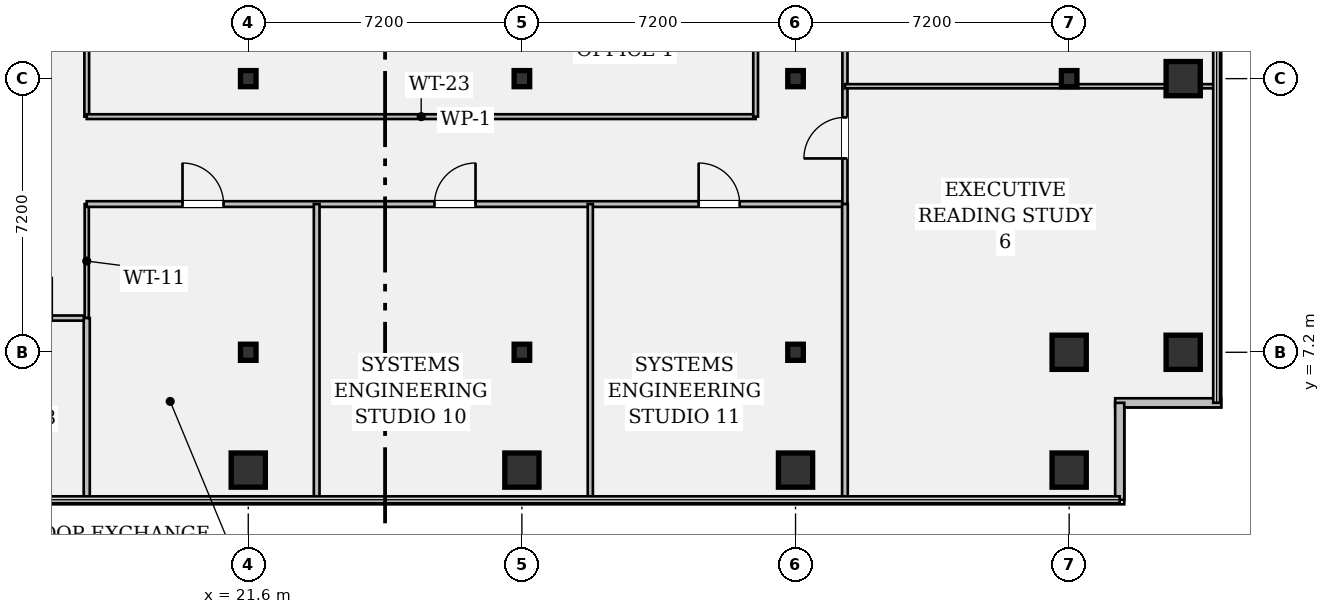
"""IFC4 building model, lengths in metres.
Left out: names, types, materials, properties, quantities, classifications, styles, units other than length and angle.
Written with IfcOpenShell. Run it as: python <this file> out.ifc"""

import sys

from ifc_helpers import new_model, si_unit, direction, frame, frame_2d, origin, origin_2d, place, context, subcontext, project, spatial, rectangle, hollow_rectangle, i_section, extrude, element, fill, save


model = new_model("IFC4")
c1 = context("Model", 3, precision=1e-05, world=origin(), true_north=direction((0.0, 1.0)))
c2 = subcontext(c1, "Body", "Model", "MODEL_VIEW")
j1 = project(units=[si_unit("LENGTHUNIT", "METRE"), si_unit("PLANEANGLEUNIT", "RADIAN")], contexts=[c1])
p1 = place(None, origin())
s1 = spatial("IfcSite", under=j1, at=p1, CompositionType="ELEMENT")
p2 = place(p1, origin())
s2 = spatial("IfcBuilding", under=s1, at=p2, CompositionType="ELEMENT")
p3 = place(p2, frame((0.0, 0.0, 133.0)))
s3 = spatial("IfcBuildingStorey", under=s2, at=p3, CompositionType="ELEMENT", Elevation=133.0)
p4 = place(p3, frame((21.6, 4.1, 0.0), z_axis=(0.0, 0.0, 1.0), x_axis=(1.0, 0.0, 0.0)))
e1 = element("IfcColumn", 1, at=p4, inside=s3, PredefinedType="COLUMN", context=c2, shape_type="SweptSolid", body=[
    extrude(hollow_rectangle(XDim=0.9, YDim=0.9, WallThickness=0.055, at=origin_2d()), origin(), (0.0, 0.0, 1.0), 3.58),
])
for number, where, z_axis, x_axis in (
    (2, (21.6, 7.2, 0.0), (0.0, 0.0, 1.0), (1.0, 0.0, 0.0)),
    (3, (21.6, 14.4, 0.0), (0.0, 0.0, 1.0), (1.0, 0.0, 0.0)),
):
    element("IfcColumn", number, at=place(p3, frame(where, z_axis=z_axis, x_axis=x_axis)), inside=s3, PredefinedType="COLUMN", context=c2, shape_type="SweptSolid", body=[
        extrude(i_section(OverallWidth=0.409, OverallDepth=0.424, WebThickness=0.033, FlangeThickness=0.052, FilletRadius=0.018, at=origin_2d()), origin(), (0.0, 0.0, 1.0), 3.58),
    ])
p5 = place(p3, frame((28.8, 4.1, 0.0), z_axis=(0.0, 0.0, 1.0), x_axis=(1.0, 0.0, 0.0)))
e4 = element("IfcColumn", 4, at=p5, inside=s3, PredefinedType="COLUMN", context=c2, shape_type="SweptSolid", body=[
    extrude(hollow_rectangle(XDim=0.9, YDim=0.9, WallThickness=0.055, at=origin_2d()), origin(), (0.0, 0.0, 1.0), 3.58),
])
for number, where, z_axis, x_axis in (
    (5, (28.8, 7.2, 0.0), (0.0, 0.0, 1.0), (1.0, 0.0, 0.0)),
    (6, (28.8, 14.4, 0.0), (0.0, 0.0, 1.0), (1.0, 0.0, 0.0)),
):
    element("IfcColumn", number, at=place(p3, frame(where, z_axis=z_axis, x_axis=x_axis)), inside=s3, PredefinedType="COLUMN", context=c2, shape_type="SweptSolid", body=[
        extrude(i_section(OverallWidth=0.409, OverallDepth=0.424, WebThickness=0.033, FlangeThickness=0.052, FilletRadius=0.018, at=origin_2d()), origin(), (0.0, 0.0, 1.0), 3.58),
    ])
p6 = place(p3, frame((36.0, 4.1, 0.0), z_axis=(0.0, 0.0, 1.0), x_axis=(1.0, 0.0, 0.0)))
e7 = element("IfcColumn", 7, at=p6, inside=s3, PredefinedType="COLUMN", context=c2, shape_type="SweptSolid", body=[
    extrude(hollow_rectangle(XDim=0.9, YDim=0.9, WallThickness=0.055, at=origin_2d()), origin(), (0.0, 0.0, 1.0), 3.58),
])
for number, where, z_axis, x_axis in (
    (8, (36.0, 7.2, 0.0), (0.0, 0.0, 1.0), (1.0, 0.0, 0.0)),
    (9, (36.0, 14.4, 0.0), (0.0, 0.0, 1.0), (1.0, 0.0, 0.0)),
):
    element("IfcColumn", number, at=place(p3, frame(where, z_axis=z_axis, x_axis=x_axis)), inside=s3, PredefinedType="COLUMN", context=c2, shape_type="SweptSolid", body=[
        extrude(i_section(OverallWidth=0.409, OverallDepth=0.424, WebThickness=0.033, FlangeThickness=0.052, FilletRadius=0.018, at=origin_2d()), origin(), (0.0, 0.0, 1.0), 3.58),
    ])
for number, where, z_axis, x_axis in (
    (10, (43.2, 4.1, 0.0), (0.0, 0.0, 1.0), (1.0, 0.0, 0.0)),
    (11, (43.2, 7.2, 0.0), (0.0, 0.0, 1.0), (1.0, 0.0, 0.0)),
):
    element("IfcColumn", number, at=place(p3, frame(where, z_axis=z_axis, x_axis=x_axis)), inside=s3, PredefinedType="COLUMN", context=c2, shape_type="SweptSolid", body=[
        extrude(hollow_rectangle(XDim=0.9, YDim=0.9, WallThickness=0.055, at=origin_2d()), origin(), (0.0, 0.0, 1.0), 3.58),
    ])
p7 = place(p3, frame((43.2, 14.4, 0.0), z_axis=(0.0, 0.0, 1.0), x_axis=(1.0, 0.0, 0.0)))
e12 = element("IfcColumn", 12, at=p7, inside=s3, PredefinedType="COLUMN", context=c2, shape_type="SweptSolid", body=[
    extrude(i_section(OverallWidth=0.409, OverallDepth=0.424, WebThickness=0.033, FlangeThickness=0.052, FilletRadius=0.018, at=origin_2d()), origin(), (0.0, 0.0, 1.0), 3.58),
])
for number, where, z_axis, x_axis in (
    (13, (46.2, 7.2, 0.0), (0.0, 0.0, 1.0), (1.0, 0.0, 0.0)),
    (14, (46.2, 14.4, 0.0), (0.0, 0.0, 1.0), (1.0, 0.0, 0.0)),
):
    element("IfcColumn", number, at=place(p3, frame(where, z_axis=z_axis, x_axis=x_axis)), inside=s3, PredefinedType="COLUMN", context=c2, shape_type="SweptSolid", body=[
        extrude(hollow_rectangle(XDim=0.9, YDim=0.9, WallThickness=0.055, at=origin_2d()), origin(), (0.0, 0.0, 1.0), 3.58),
    ])
p8 = place(p3, frame((47.2, 5.87, 0.0), z_axis=(0.0, 0.0, 1.0), x_axis=(-1.0, 0.0, 0.0)))
e15 = element("IfcWall", 15, at=p8, inside=s3, PredefinedType="STANDARD", context=c2, shape_type="SweptSolid", body=[
    extrude(rectangle(XDim=2.79, YDim=0.24, at=frame_2d((1.395, 0.0))), origin(), (0.0, 0.0, 1.0), 3.58),
])
p9 = place(p3, frame((44.53, 5.87, 0.0), z_axis=(0.0, 0.0, 1.0), x_axis=(0.0, -1.0, 0.0)))
e16 = element("IfcWall", 16, at=p9, inside=s3, PredefinedType="STANDARD", context=c2, shape_type="SweptSolid", body=[
    extrude(rectangle(XDim=2.55, YDim=0.24, at=frame_2d((1.275, 0.0))), origin(), (0.0, 0.0, 1.0), 3.58),
])
p10 = place(p3, frame((14.4, 8.1, 0.0), z_axis=(0.0, 0.0, 1.0), x_axis=(1.0, 0.0, 0.0)))
e17 = element("IfcWall", 17, at=p10, inside=s3, PredefinedType="PARTITIONING", context=c2, shape_type="SweptSolid", body=[
    extrude(rectangle(XDim=2.95, YDim=0.135, at=frame_2d((1.475, 0.0))), origin(), (0.0, 0.0, 1.0), 3.148),
])
p11 = place(p10, frame((0.95, 0.0, 0.0)))
e18 = element("IfcOpeningElement", 18, at=p11, cuts=e17, PredefinedType="OPENING", context=c2, shape_type="SweptSolid", body=[
    extrude(rectangle(XDim=1.08, YDim=2.15, at=frame_2d((0.54, 1.075))), frame((0.0, 0.08, 0.0), z_axis=(0.0, -1.0, 0.0), x_axis=(1.0, 0.0, 0.0)), (0.0, 0.0, 1.0), 0.159),
])
p12 = place(p3, frame((17.35, 8.1, 0.0), z_axis=(0.0, 0.0, 1.0), x_axis=(0.0, 1.0, 0.0)))
e19 = element("IfcWall", 19, at=p12, inside=s3, PredefinedType="PARTITIONING", context=c2, shape_type="SweptSolid", body=[
    extrude(rectangle(XDim=3.0, YDim=0.11, at=frame_2d((1.5, 0.0))), origin(), (0.0, 0.0, 1.0), 3.58),
])
p13 = place(p3, frame((17.35, 11.1, 0.0), z_axis=(0.0, 0.0, 1.0), x_axis=(1.0, 0.0, 0.0)))
e20 = element("IfcWall", 20, at=p13, inside=s3, PredefinedType="PARTITIONING", context=c2, shape_type="SweptSolid", body=[
    extrude(rectangle(XDim=19.95, YDim=0.15, at=frame_2d((9.975, 0.0))), origin(), (0.0, 0.0, 1.0), 2.869),
])
p14 = place(p13, frame((2.52, 0.0, 0.0)))
e21 = element("IfcOpeningElement", 21, at=p14, cuts=e20, PredefinedType="OPENING", context=c2, shape_type="SweptSolid", body=[
    extrude(rectangle(XDim=1.08, YDim=2.15, at=frame_2d((0.54, 1.075))), frame((0.0, 0.087, 0.0), z_axis=(0.0, -1.0, 0.0), x_axis=(1.0, 0.0, 0.0)), (0.0, 0.0, 1.0), 0.174),
])
p15 = place(p13, frame((9.15, 0.0, 0.0)))
e22 = element("IfcOpeningElement", 22, at=p15, cuts=e20, PredefinedType="OPENING", context=c2, shape_type="SweptSolid", body=[
    extrude(rectangle(XDim=1.08, YDim=2.15, at=frame_2d((0.54, 1.075))), frame((0.0, 0.087, 0.0), z_axis=(0.0, -1.0, 0.0), x_axis=(1.0, 0.0, 0.0)), (0.0, 0.0, 1.0), 0.174),
])
p16 = place(p13, frame((16.1, 0.0, 0.0)))
e23 = element("IfcOpeningElement", 23, at=p16, cuts=e20, PredefinedType="OPENING", context=c2, shape_type="SweptSolid", body=[
    extrude(rectangle(XDim=1.08, YDim=2.15, at=frame_2d((0.54, 1.075))), frame((0.0, 0.087, 0.0), z_axis=(0.0, -1.0, 0.0), x_axis=(1.0, 0.0, 0.0)), (0.0, 0.0, 1.0), 0.174),
])
p17 = place(p3, frame((37.3, 11.1, 0.0), z_axis=(0.0, 0.0, 1.0), x_axis=(0.0, 1.0, 0.0)))
e24 = element("IfcWall", 24, at=p17, inside=s3, PredefinedType="PARTITIONING", context=c2, shape_type="SweptSolid", body=[
    extrude(rectangle(XDim=9.6, YDim=0.135, at=frame_2d((4.8, 0.0))), origin(), (0.0, 0.0, 1.0), 2.869),
])
p18 = place(p17, frame((1.2, 0.0, 0.0)))
e25 = element("IfcOpeningElement", 25, at=p18, cuts=e24, PredefinedType="OPENING", context=c2, shape_type="SweptSolid", body=[
    extrude(rectangle(XDim=1.08, YDim=2.15, at=frame_2d((0.54, 1.075))), frame((0.0, 0.08, 0.0), z_axis=(0.0, -1.0, 0.0), x_axis=(1.0, 0.0, 0.0)), (0.0, 0.0, 1.0), 0.159),
])
p19 = place(p17, frame((7.6, 0.0, 0.0)))
e26 = element("IfcOpeningElement", 26, at=p19, cuts=e24, PredefinedType="OPENING", context=c2, shape_type="SweptSolid", body=[
    extrude(rectangle(XDim=1.08, YDim=2.15, at=frame_2d((0.54, 1.075))), frame((0.0, 0.08, 0.0), z_axis=(0.0, -1.0, 0.0), x_axis=(1.0, 0.0, 0.0)), (0.0, 0.0, 1.0), 0.159),
])
p20 = place(p3, frame((17.35, 13.4, 0.0), z_axis=(0.0, 0.0, 1.0), x_axis=(0.0, 1.0, 0.0)))
e27 = element("IfcWall", 27, at=p20, inside=s3, PredefinedType="PARTITIONING", context=c2, shape_type="SweptSolid", body=[
    extrude(rectangle(XDim=4.95, YDim=0.125, at=frame_2d((2.475, 0.0))), origin(), (0.0, 0.0, 1.0), 2.869),
])
p21 = place(p3, frame((17.35, 13.4, 0.0), z_axis=(0.0, 0.0, 1.0), x_axis=(1.0, 0.0, 0.0)))
e28 = element("IfcWall", 28, at=p21, inside=s3, PredefinedType="PARTITIONING", context=c2, shape_type="SweptSolid", body=[
    extrude(rectangle(XDim=17.6, YDim=0.125, at=frame_2d((8.8, 0.0))), origin(), (0.0, 0.0, 1.0), 2.869),
])
p22 = place(p3, frame((34.95, 13.4, 0.0), z_axis=(0.0, 0.0, 1.0), x_axis=(0.0, 1.0, 0.0)))
e29 = element("IfcWall", 29, at=p22, inside=s3, PredefinedType="PARTITIONING", context=c2, shape_type="SweptSolid", body=[
    extrude(rectangle(XDim=4.95, YDim=0.125, at=frame_2d((2.475, 0.0))), origin(), (0.0, 0.0, 1.0), 2.869),
])
p23 = place(p3, frame((37.3, 3.32, 0.0), z_axis=(0.0, 0.0, 1.0), x_axis=(0.0, 1.0, 0.0)))
e30 = element("IfcWall", 30, at=p23, inside=s3, PredefinedType="PARTITIONING", context=c2, shape_type="SweptSolid", body=[
    extrude(rectangle(XDim=7.78, YDim=0.15, at=frame_2d((3.89, 0.0))), origin(), (0.0, 0.0, 1.0), 2.869),
])
p24 = place(p3, frame((37.3, 14.2, 0.0), z_axis=(0.0, 0.0, 1.0), x_axis=(1.0, 0.0, 0.0)))
e31 = element("IfcWall", 31, at=p24, inside=s3, PredefinedType="PARTITIONING", context=c2, shape_type="SweptSolid", body=[
    extrude(rectangle(XDim=9.78, YDim=0.11, at=frame_2d((4.89, 0.0))), origin(), (0.0, 0.0, 1.0), 2.869),
])
p25 = place(p3, frame((17.35, 3.32, 0.0), z_axis=(0.0, 0.0, 1.0), x_axis=(0.0, 1.0, 0.0)))
e32 = element("IfcWall", 32, at=p25, inside=s3, PredefinedType="PARTITIONING", context=c2, shape_type="SweptSolid", body=[
    extrude(rectangle(XDim=4.78, YDim=0.16, at=frame_2d((2.39, 0.0))), origin(), (0.0, 0.0, 1.0), 2.869),
])
p26 = place(p3, frame((23.4, 3.32, 0.0), z_axis=(0.0, 0.0, 1.0), x_axis=(0.0, 1.0, 0.0)))
e33 = element("IfcWall", 33, at=p26, inside=s3, PredefinedType="PARTITIONING", context=c2, shape_type="SweptSolid", body=[
    extrude(rectangle(XDim=7.78, YDim=0.15, at=frame_2d((3.89, 0.0))), origin(), (0.0, 0.0, 1.0), 2.869),
])
p27 = place(p3, frame((30.6, 3.32, 0.0), z_axis=(0.0, 0.0, 1.0), x_axis=(0.0, 1.0, 0.0)))
e34 = element("IfcWall", 34, at=p27, inside=s3, PredefinedType="PARTITIONING", context=c2, shape_type="SweptSolid", body=[
    extrude(rectangle(XDim=7.78, YDim=0.135, at=frame_2d((3.89, 0.0))), origin(), (0.0, 0.0, 1.0), 2.869),
])
p28 = place(p18, origin())
e35 = element("IfcDoor", 35, at=p28, inside=s3, OperationType="SINGLE_SWING_LEFT", PredefinedType="DOOR", context=c2, shape_type="SweptSolid", body=[
    extrude(rectangle(XDim=1.08, YDim=2.15, at=frame_2d((0.54, 1.075))), frame((0.0, 0.025, 0.0), z_axis=(0.0, -1.0, 0.0), x_axis=(1.0, 0.0, 0.0)), (0.0, 0.0, 1.0), 0.05),
])
fill(e25, e35)
p29 = place(p14, origin())
e36 = element("IfcDoor", 36, at=p29, inside=s3, OperationType="SINGLE_SWING_LEFT", PredefinedType="DOOR", context=c2, shape_type="SweptSolid", body=[
    extrude(rectangle(XDim=1.08, YDim=2.15, at=frame_2d((0.54, 1.075))), frame((0.0, 0.025, 0.0), z_axis=(0.0, -1.0, 0.0), x_axis=(1.0, 0.0, 0.0)), (0.0, 0.0, 1.0), 0.05),
])
fill(e21, e36)
p30 = place(p15, origin())
e37 = element("IfcDoor", 37, at=p30, inside=s3, OperationType="SINGLE_SWING_RIGHT", PredefinedType="DOOR", context=c2, shape_type="SweptSolid", body=[
    extrude(rectangle(XDim=1.08, YDim=2.15, at=frame_2d((0.54, 1.075))), frame((0.0, 0.025, 0.0), z_axis=(0.0, -1.0, 0.0), x_axis=(1.0, 0.0, 0.0)), (0.0, 0.0, 1.0), 0.05),
])
fill(e22, e37)
p31 = place(p16, origin())
e38 = element("IfcDoor", 38, at=p31, inside=s3, OperationType="SINGLE_SWING_LEFT", PredefinedType="DOOR", context=c2, shape_type="SweptSolid", body=[
    extrude(rectangle(XDim=1.08, YDim=2.15, at=frame_2d((0.54, 1.075))), frame((0.0, 0.025, 0.0), z_axis=(0.0, -1.0, 0.0), x_axis=(1.0, 0.0, 0.0)), (0.0, 0.0, 1.0), 0.05),
])
fill(e23, e38)
save(model, sys.argv[1])
